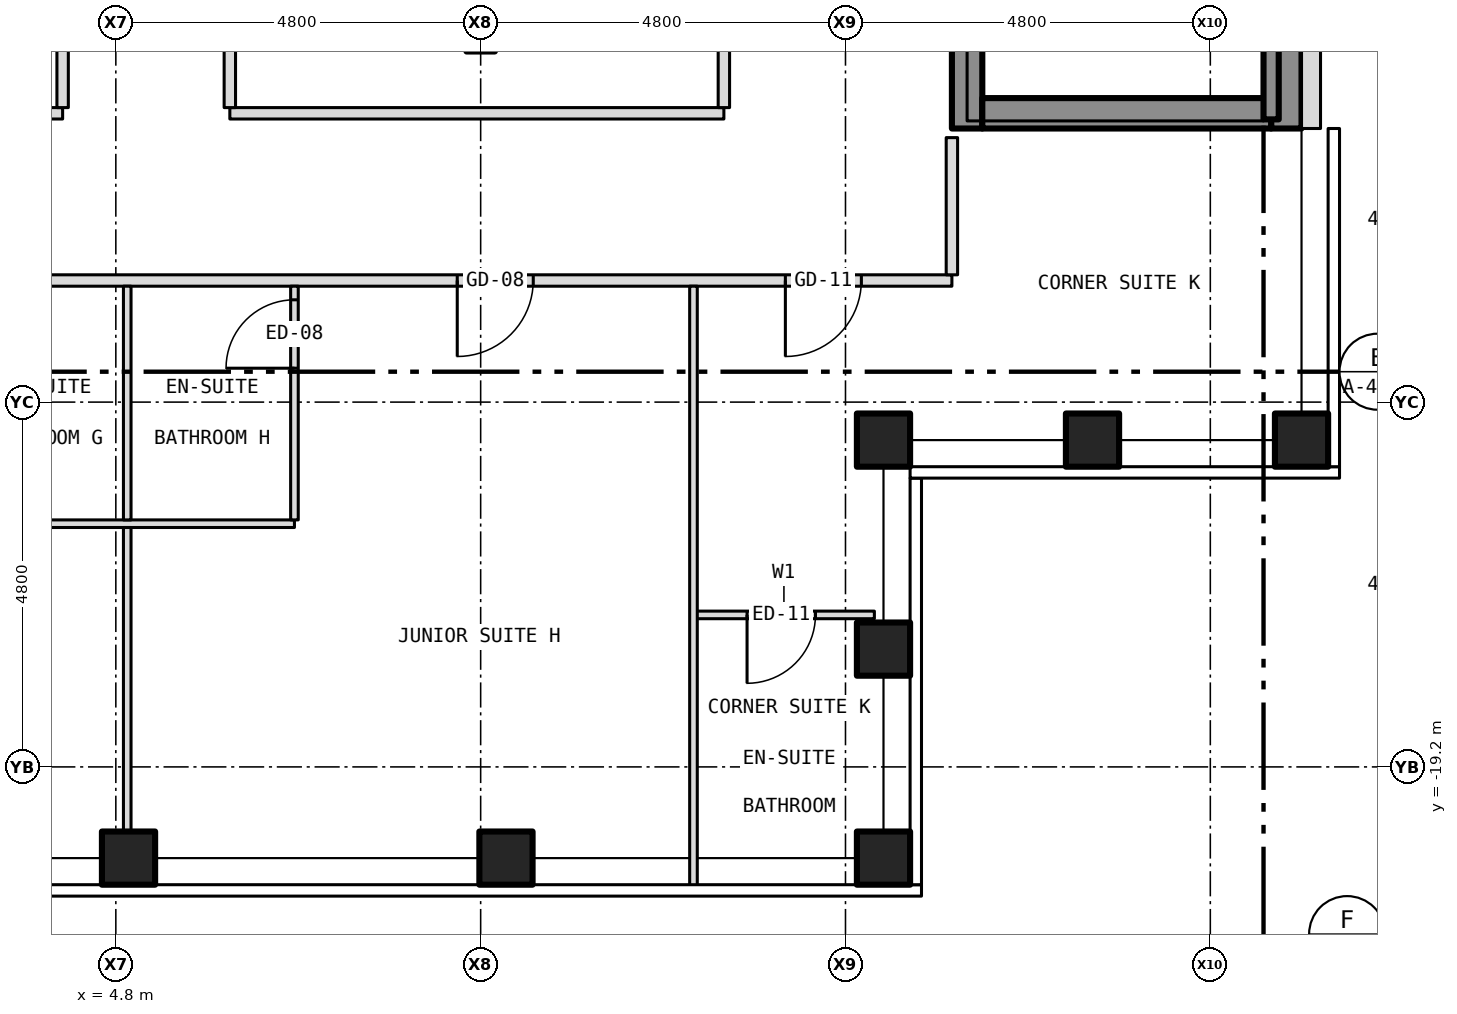
"""IFC4 building model, lengths in metres.
Left out: names, types, materials, properties, quantities, classifications, styles, units other than length and angle.
Written with IfcOpenShell. Run it as: python <this file> out.ifc"""

import sys

from ifc_helpers import new_model, si_unit, direction, frame, frame_2d, origin, origin_2d, place, context, subcontext, project, spatial, rectangle, hollow_rectangle, extrude, element, fill, save


model = new_model("IFC4")
c1 = context("Model", 3, precision=1e-05, world=origin(), true_north=direction((0.0, 1.0)))
c2 = subcontext(c1, "Body", "Model", "MODEL_VIEW")
j1 = project(units=[si_unit("LENGTHUNIT", "METRE"), si_unit("PLANEANGLEUNIT", "RADIAN")], contexts=[c1])
p1 = place(None, origin())
s1 = spatial("IfcSite", under=j1, at=p1, CompositionType="ELEMENT")
p2 = place(p1, origin())
s2 = spatial("IfcBuilding", under=s1, at=p2, CompositionType="ELEMENT")
p3 = place(p2, frame((0.0, 0.0, 198.0)))
s3 = spatial("IfcBuildingStorey", under=s2, at=p3, CompositionType="ELEMENT", Elevation=198.0)
for number, where, z_axis, x_axis in (
    (1, (4.967, -20.4, -0.15), (0.0, 0.0, 1.0), (1.0, 0.0, 0.0)),
    (2, (9.933, -20.4, -0.15), (0.0, 0.0, 1.0), (1.0, 0.0, 0.0)),
    (3, (14.9, -20.4, -0.15), (0.0, 0.0, 1.0), (1.0, 0.0, 0.0)),
    (4, (20.4, -14.9, -0.15), (0.0, 0.0, 1.0), (1.0, 0.0, 0.0)),
    (5, (14.9, -14.9, -0.15), (0.0, 0.0, 1.0), (1.0, 0.0, 0.0)),
    (6, (14.9, -17.65, -0.15), (0.0, 0.0, 1.0), (1.0, 0.0, 0.0)),
    (7, (17.65, -14.9, -0.15), (0.0, 0.0, 1.0), (1.0, 0.0, 0.0)),
):
    element("IfcColumn", number, at=place(p3, frame(where, z_axis=z_axis, x_axis=x_axis)), inside=s3, PredefinedType="COLUMN", context=c2, shape_type="SweptSolid", body=[
        extrude(hollow_rectangle(XDim=0.7, YDim=0.7, WallThickness=0.04, at=origin_2d()), origin(), (0.0, 0.0, 1.0), 3.5),
    ])
p4 = place(p3, frame((16.0, -10.8, 0.0), z_axis=(0.0, 0.0, 1.0), x_axis=(0.0, 1.0, 0.0)))
e8 = element("IfcWall", 8, at=p4, inside=s3, PredefinedType="SHEAR", context=c2, shape_type="SweptSolid", body=[
    extrude(rectangle(XDim=21.6, YDim=0.4, at=frame_2d((10.8, 0.0))), origin(), (0.0, 0.0, 1.0), 3.25),
])
p5 = place(p4, frame((9.4, 0.0, 0.0)))
e9 = element("IfcOpeningElement", 9, at=p5, cuts=e8, PredefinedType="OPENING", context=c2, shape_type="SweptSolid", body=[
    extrude(rectangle(XDim=1.1, YDim=2.1, at=frame_2d((0.55, 1.05))), frame((0.0, 0.212, 0.0), z_axis=(0.0, -1.0, 0.0), x_axis=(1.0, 0.0, 0.0)), (0.0, 0.0, 1.0), 0.424),
])
p6 = place(p4, frame((11.5, 0.0, 0.0)))
e10 = element("IfcOpeningElement", 10, at=p6, cuts=e8, PredefinedType="OPENING", context=c2, shape_type="SweptSolid", body=[
    extrude(rectangle(XDim=1.1, YDim=2.1, at=frame_2d((0.55, 1.05))), frame((0.0, 0.212, 0.0), z_axis=(0.0, -1.0, 0.0), x_axis=(1.0, 0.0, 0.0)), (0.0, 0.0, 1.0), 0.424),
])
p7 = place(p4, frame((13.6, 0.0, 0.0)))
e11 = element("IfcOpeningElement", 11, at=p7, cuts=e8, PredefinedType="OPENING", context=c2, shape_type="SweptSolid", body=[
    extrude(rectangle(XDim=1.1, YDim=2.1, at=frame_2d((0.55, 1.05))), frame((0.0, 0.212, 0.0), z_axis=(0.0, -1.0, 0.0), x_axis=(1.0, 0.0, 0.0)), (0.0, 0.0, 1.0), 0.424),
])
p8 = place(p4, frame((15.7, 0.0, 0.0)))
e12 = element("IfcOpeningElement", 12, at=p8, cuts=e8, PredefinedType="OPENING", context=c2, shape_type="SweptSolid", body=[
    extrude(rectangle(XDim=1.1, YDim=2.1, at=frame_2d((0.55, 1.05))), frame((0.0, 0.212, 0.0), z_axis=(0.0, -1.0, 0.0), x_axis=(1.0, 0.0, 0.0)), (0.0, 0.0, 1.0), 0.424),
])
p9 = place(p4, frame((17.8, 0.0, 0.0)))
e13 = element("IfcOpeningElement", 13, at=p9, cuts=e8, PredefinedType="OPENING", context=c2, shape_type="SweptSolid", body=[
    extrude(rectangle(XDim=1.1, YDim=2.1, at=frame_2d((0.55, 1.05))), frame((0.0, 0.212, 0.0), z_axis=(0.0, -1.0, 0.0), x_axis=(1.0, 0.0, 0.0)), (0.0, 0.0, 1.0), 0.424),
])
p10 = place(p4, frame((5.642, 0.0, 0.0)))
e14 = element("IfcOpeningElement", 14, at=p10, cuts=e8, PredefinedType="OPENING", context=c2, shape_type="SweptSolid", body=[
    extrude(rectangle(XDim=1.1, YDim=2.1, at=frame_2d((0.55, 1.05))), frame((0.0, 0.212, 0.0), z_axis=(0.0, -1.0, 0.0), x_axis=(1.0, 0.0, 0.0)), (0.0, 0.0, 1.0), 0.424),
])
p11 = place(p4, frame((7.5, 0.0, 0.0)))
e15 = element("IfcOpeningElement", 15, at=p11, cuts=e8, PredefinedType="OPENING", context=c2, shape_type="SweptSolid", body=[
    extrude(rectangle(XDim=1.1, YDim=2.1, at=frame_2d((0.55, 1.05))), frame((0.0, 0.212, 0.0), z_axis=(0.0, -1.0, 0.0), x_axis=(1.0, 0.0, 0.0)), (0.0, 0.0, 1.0), 0.424),
])
p12 = place(p4, frame((20.0, 0.0, 0.0)))
e16 = element("IfcOpeningElement", 16, at=p12, cuts=e8, PredefinedType="OPENING", context=c2, shape_type="SweptSolid", body=[
    extrude(rectangle(XDim=0.9, YDim=2.1, at=frame_2d((0.45, 1.05))), frame((0.0, 0.212, 0.0), z_axis=(0.0, -1.0, 0.0), x_axis=(1.0, 0.0, 0.0)), (0.0, 0.0, 1.0), 0.424),
])
p13 = place(p3, frame((20.2, -10.8, 0.0), z_axis=(0.0, 0.0, 1.0), x_axis=(0.0, 1.0, 0.0)))
e17 = element("IfcWall", 17, at=p13, inside=s3, PredefinedType="SHEAR", context=c2, shape_type="SweptSolid", body=[
    extrude(rectangle(XDim=21.6, YDim=0.4, at=frame_2d((10.8, 0.0))), origin(), (0.0, 0.0, 1.0), 3.25),
])
p14 = place(p3, frame((16.2, -10.6, 0.0), z_axis=(0.0, 0.0, 1.0), x_axis=(1.0, 0.0, 0.0)))
e18 = element("IfcWall", 18, at=p14, inside=s3, PredefinedType="SHEAR", context=c2, shape_type="SweptSolid", body=[
    extrude(rectangle(XDim=3.8, YDim=0.4, at=frame_2d((1.9, 0.0))), origin(), (0.0, 0.0, 1.0), 3.25),
])
p15 = place(p3, frame((20.525, -10.8, 0.0), z_axis=(0.0, 0.0, 1.0), x_axis=(0.0, 1.0, 0.0)))
e19 = element("IfcWall", 19, at=p15, inside=s3, PredefinedType="SOLIDWALL", context=c2, shape_type="SweptSolid", body=[
    extrude(rectangle(XDim=21.6, YDim=0.25, at=frame_2d((10.8, 0.0))), origin(), (0.0, 0.0, 1.0), 3.5),
])
p16 = place(p15, frame((2.95, 0.0, 1.0)))
e20 = element("IfcOpeningElement", 20, at=p16, cuts=e19, PredefinedType="OPENING", context=c2, shape_type="SweptSolid", body=[
    extrude(rectangle(XDim=0.6, YDim=1.5, at=frame_2d((0.3, 0.75))), frame((0.0, 0.137, 0.0), z_axis=(0.0, -1.0, 0.0), x_axis=(1.0, 0.0, 0.0)), (0.0, 0.0, 1.0), 0.274),
])
p17 = place(p3, frame((12.4, -17.2, 0.0), z_axis=(0.0, 0.0, 1.0), x_axis=(1.0, 0.0, 0.0)))
e21 = element("IfcWall", 21, at=p17, inside=s3, PredefinedType="PARTITIONING", context=c2, shape_type="SweptSolid", body=[
    extrude(rectangle(XDim=2.38, YDim=0.1, at=frame_2d((1.19, 0.0))), origin(), (0.0, 0.0, 1.0), 3.35),
])
p18 = place(p17, frame((0.705, 0.0, 0.0)))
e22 = element("IfcOpeningElement", 22, at=p18, cuts=e21, PredefinedType="OPENING", context=c2, shape_type="SweptSolid", body=[
    extrude(rectangle(XDim=0.9, YDim=2.1, at=frame_2d((0.45, 1.05))), frame((0.0, 0.062, 0.0), z_axis=(0.0, -1.0, 0.0), x_axis=(1.0, 0.0, 0.0)), (0.0, 0.0, 1.0), 0.124),
])
p19 = place(p3, frame((2.75, -16.0, 0.0), z_axis=(0.0, 0.0, 1.0), x_axis=(1.0, 0.0, 0.0)))
e23 = element("IfcWall", 23, at=p19, inside=s3, PredefinedType="PARTITIONING", context=c2, shape_type="SweptSolid", body=[
    extrude(rectangle(XDim=4.4, YDim=0.1, at=frame_2d((2.2, 0.0))), origin(), (0.0, 0.0, 1.0), 3.35),
])
p20 = place(p3, frame((-15.8, -12.8, 0.0), z_axis=(0.0, 0.0, 1.0), x_axis=(1.0, 0.0, 0.0)))
e24 = element("IfcWall", 24, at=p20, inside=s3, PredefinedType="PARTITIONING", context=c2, shape_type="SweptSolid", body=[
    extrude(rectangle(XDim=31.6, YDim=0.15, at=frame_2d((15.8, 0.0))), origin(), (0.0, 0.0, 1.0), 3.35),
])
p21 = place(p20, frame((6.466, 0.0, 0.0)))
e25 = element("IfcOpeningElement", 25, at=p21, cuts=e24, PredefinedType="OPENING", context=c2, shape_type="SweptSolid", body=[
    extrude(rectangle(XDim=1.0, YDim=2.1, at=frame_2d((0.5, 1.05))), frame((0.0, 0.087, 0.0), z_axis=(0.0, -1.0, 0.0), x_axis=(1.0, 0.0, 0.0)), (0.0, 0.0, 1.0), 0.174),
])
p22 = place(p20, frame((11.434, 0.0, 0.0)))
e26 = element("IfcOpeningElement", 26, at=p22, cuts=e24, PredefinedType="OPENING", context=c2, shape_type="SweptSolid", body=[
    extrude(rectangle(XDim=1.0, YDim=2.1, at=frame_2d((0.5, 1.05))), frame((0.0, 0.087, 0.0), z_axis=(0.0, -1.0, 0.0), x_axis=(1.0, 0.0, 0.0)), (0.0, 0.0, 1.0), 0.174),
])
p23 = place(p20, frame((15.442, 0.0, 0.0)))
e27 = element("IfcOpeningElement", 27, at=p23, cuts=e24, PredefinedType="OPENING", context=c2, shape_type="SweptSolid", body=[
    extrude(rectangle(XDim=1.0, YDim=2.1, at=frame_2d((0.5, 1.05))), frame((0.0, 0.087, 0.0), z_axis=(0.0, -1.0, 0.0), x_axis=(1.0, 0.0, 0.0)), (0.0, 0.0, 1.0), 0.174),
])
p24 = place(p20, frame((25.092, 0.0, 0.0)))
e28 = element("IfcOpeningElement", 28, at=p24, cuts=e24, PredefinedType="OPENING", context=c2, shape_type="SweptSolid", body=[
    extrude(rectangle(XDim=1.0, YDim=2.1, at=frame_2d((0.5, 1.05))), frame((0.0, 0.087, 0.0), z_axis=(0.0, -1.0, 0.0), x_axis=(1.0, 0.0, 0.0)), (0.0, 0.0, 1.0), 0.174),
])
p25 = place(p20, frame((1.192, 0.0, 0.0)))
e29 = element("IfcOpeningElement", 29, at=p25, cuts=e24, PredefinedType="OPENING", context=c2, shape_type="SweptSolid", body=[
    extrude(rectangle(XDim=1.0, YDim=2.1, at=frame_2d((0.5, 1.05))), frame((0.0, 0.087, 0.0), z_axis=(0.0, -1.0, 0.0), x_axis=(1.0, 0.0, 0.0)), (0.0, 0.0, 1.0), 0.174),
])
p26 = place(p20, frame((29.409, 0.0, 0.0)))
e30 = element("IfcOpeningElement", 30, at=p26, cuts=e24, PredefinedType="OPENING", context=c2, shape_type="SweptSolid", body=[
    extrude(rectangle(XDim=1.0, YDim=2.1, at=frame_2d((0.5, 1.05))), frame((0.0, 0.087, 0.0), z_axis=(0.0, -1.0, 0.0), x_axis=(1.0, 0.0, 0.0)), (0.0, 0.0, 1.0), 0.174),
])
p27 = place(p3, frame((-12.8, -10.6, 0.0), z_axis=(0.0, 0.0, 1.0), x_axis=(1.0, 0.0, 0.0)))
e31 = element("IfcWall", 31, at=p27, inside=s3, PredefinedType="PARTITIONING", context=c2, shape_type="SweptSolid", body=[
    extrude(rectangle(XDim=16.9, YDim=0.15, at=frame_2d((8.45, 0.0))), origin(), (0.0, 0.0, 1.0), 3.35),
])
p28 = place(p27, frame((5.95, 0.0, 0.0)))
e32 = element("IfcOpeningElement", 32, at=p28, cuts=e31, PredefinedType="OPENING", context=c2, shape_type="SweptSolid", body=[
    extrude(rectangle(XDim=0.9, YDim=2.1, at=frame_2d((0.45, 1.05))), frame((0.0, 0.087, 0.0), z_axis=(0.0, -1.0, 0.0), x_axis=(1.0, 0.0, 0.0)), (0.0, 0.0, 1.0), 0.174),
])
p29 = place(p3, frame((6.3, -10.6, 0.0), z_axis=(0.0, 0.0, 1.0), x_axis=(1.0, 0.0, 0.0)))
e33 = element("IfcWall", 33, at=p29, inside=s3, PredefinedType="PARTITIONING", context=c2, shape_type="SweptSolid", body=[
    extrude(rectangle(XDim=6.5, YDim=0.15, at=frame_2d((3.25, 0.0))), origin(), (0.0, 0.0, 1.0), 3.35),
])
p30 = place(p3, frame((4.1, -10.525, 0.0), z_axis=(0.0, 0.0, 1.0), x_axis=(0.0, 1.0, 0.0)))
e34 = element("IfcWall", 34, at=p30, inside=s3, PredefinedType="PARTITIONING", context=c2, shape_type="SweptSolid", body=[
    extrude(rectangle(XDim=17.95, YDim=0.15, at=frame_2d((8.975, 0.0))), origin(), (0.0, 0.0, 1.0), 3.35),
])
p31 = place(p30, frame((11.95, 0.0, 0.0)))
e35 = element("IfcOpeningElement", 35, at=p31, cuts=e34, PredefinedType="OPENING", context=c2, shape_type="SweptSolid", body=[
    extrude(rectangle(XDim=0.9, YDim=2.1, at=frame_2d((0.45, 1.05))), frame((0.0, 0.087, 0.0), z_axis=(0.0, -1.0, 0.0), x_axis=(1.0, 0.0, 0.0)), (0.0, 0.0, 1.0), 0.174),
])
p32 = place(p30, frame((4.775, 0.0, 0.0)))
e36 = element("IfcOpeningElement", 36, at=p32, cuts=e34, PredefinedType="OPENING", context=c2, shape_type="SweptSolid", body=[
    extrude(rectangle(XDim=0.9, YDim=2.1, at=frame_2d((0.45, 1.05))), frame((0.0, 0.087, 0.0), z_axis=(0.0, -1.0, 0.0), x_axis=(1.0, 0.0, 0.0)), (0.0, 0.0, 1.0), 0.174),
])
p33 = place(p3, frame((4.95, -20.28, 0.0), z_axis=(0.0, 0.0, 1.0), x_axis=(0.0, 1.0, 0.0)))
e37 = element("IfcWall", 37, at=p33, inside=s3, PredefinedType="PARTITIONING", context=c2, shape_type="SweptSolid", body=[
    extrude(rectangle(XDim=4.23, YDim=0.1, at=frame_2d((2.115, 0.0))), origin(), (0.0, 0.0, 1.0), 2.817),
])
p34 = place(p3, frame((4.95, -15.95, 0.0), z_axis=(0.0, 0.0, 1.0), x_axis=(0.0, 1.0, 0.0)))
e38 = element("IfcWall", 38, at=p34, inside=s3, PredefinedType="PARTITIONING", context=c2, shape_type="SweptSolid", body=[
    extrude(rectangle(XDim=3.075, YDim=0.1, at=frame_2d((1.538, 0.0))), origin(), (0.0, 0.0, 1.0), 2.817),
])
p35 = place(p3, frame((6.3, -10.525, 0.0), z_axis=(0.0, 0.0, 1.0), x_axis=(0.0, 1.0, 0.0)))
e39 = element("IfcWall", 39, at=p35, inside=s3, PredefinedType="PARTITIONING", context=c2, shape_type="SweptSolid", body=[
    extrude(rectangle(XDim=17.95, YDim=0.15, at=frame_2d((8.975, 0.0))), origin(), (0.0, 0.0, 1.0), 3.35),
])
p36 = place(p35, frame((13.825, 0.0, 0.0)))
e40 = element("IfcOpeningElement", 40, at=p36, cuts=e39, PredefinedType="OPENING", context=c2, shape_type="SweptSolid", body=[
    extrude(rectangle(XDim=0.9, YDim=2.1, at=frame_2d((0.45, 1.05))), frame((0.0, 0.087, 0.0), z_axis=(0.0, -1.0, 0.0), x_axis=(1.0, 0.0, 0.0)), (0.0, 0.0, 1.0), 0.174),
])
p37 = place(p35, frame((4.775, 0.0, 0.0)))
e41 = element("IfcOpeningElement", 41, at=p37, cuts=e39, PredefinedType="OPENING", context=c2, shape_type="SweptSolid", body=[
    extrude(rectangle(XDim=0.9, YDim=2.1, at=frame_2d((0.45, 1.05))), frame((0.0, 0.087, 0.0), z_axis=(0.0, -1.0, 0.0), x_axis=(1.0, 0.0, 0.0)), (0.0, 0.0, 1.0), 0.174),
])
p38 = place(p3, frame((7.15, -15.95, 0.0), z_axis=(0.0, 0.0, 1.0), x_axis=(0.0, 1.0, 0.0)))
e42 = element("IfcWall", 42, at=p38, inside=s3, PredefinedType="PARTITIONING", context=c2, shape_type="SweptSolid", body=[
    extrude(rectangle(XDim=3.075, YDim=0.1, at=frame_2d((1.538, 0.0))), origin(), (0.0, 0.0, 1.0), 3.35),
])
p39 = place(p38, frame((1.996, 0.0, 0.0)))
e43 = element("IfcOpeningElement", 43, at=p39, cuts=e42, PredefinedType="OPENING", context=c2, shape_type="SweptSolid", body=[
    extrude(rectangle(XDim=0.9, YDim=2.1, at=frame_2d((0.45, 1.05))), frame((0.0, 0.062, 0.0), z_axis=(0.0, -1.0, 0.0), x_axis=(1.0, 0.0, 0.0)), (0.0, 0.0, 1.0), 0.124),
])
p40 = place(p3, frame((12.4, -20.78, 0.0), z_axis=(0.0, 0.0, 1.0), x_axis=(0.0, 1.0, 0.0)))
e44 = element("IfcWall", 44, at=p40, inside=s3, PredefinedType="PARTITIONING", context=c2, shape_type="SweptSolid", body=[
    extrude(rectangle(XDim=7.905, YDim=0.1, at=frame_2d((3.953, 0.0))), origin(), (0.0, 0.0, 1.0), 3.35),
])
p41 = place(p3, frame((12.8, -10.525, 0.0), z_axis=(0.0, 0.0, 1.0), x_axis=(0.0, 1.0, 0.0)))
e45 = element("IfcWall", 45, at=p41, inside=s3, PredefinedType="PARTITIONING", context=c2, shape_type="SweptSolid", body=[
    extrude(rectangle(XDim=8.525, YDim=0.15, at=frame_2d((4.262, 0.0))), origin(), (0.0, 0.0, 1.0), 3.35),
])
p42 = place(p3, frame((15.8, -12.725, 0.0), z_axis=(0.0, 0.0, 1.0), x_axis=(0.0, 1.0, 0.0)))
e46 = element("IfcWall", 46, at=p42, inside=s3, PredefinedType="PARTITIONING", context=c2, shape_type="SweptSolid", body=[
    extrude(rectangle(XDim=1.805, YDim=0.15, at=frame_2d((0.903, 0.0))), origin(), (0.0, 0.0, 1.0), 3.35),
])
p43 = place(p3, frame((20.0, -10.68, 0.0), z_axis=(0.0, 0.0, 1.0), x_axis=(0.0, 1.0, 0.0)))
e47 = element("IfcWall", 47, at=p43, inside=s3, PredefinedType="SHEAR", context=c2, shape_type="SweptSolid", body=[
    extrude(rectangle(XDim=6.98, YDim=0.2, at=frame_2d((3.49, 0.0))), origin(), (0.0, 0.0, 1.0), 3.25),
])
p44 = place(p24, origin())
e48 = element("IfcDoor", 48, at=p44, inside=s3, OperationType="SINGLE_SWING_LEFT", PredefinedType="DOOR", context=c2, shape_type="SweptSolid", body=[
    extrude(rectangle(XDim=1.0, YDim=2.1, at=frame_2d((0.5, 1.05))), frame((0.0, 0.025, 0.0), z_axis=(0.0, -1.0, 0.0), x_axis=(1.0, 0.0, 0.0)), (0.0, 0.0, 1.0), 0.05),
])
fill(e28, e48)
p45 = place(p39, origin())
e49 = element("IfcDoor", 49, at=p45, inside=s3, OperationType="SINGLE_SWING_LEFT", PredefinedType="DOOR", context=c2, shape_type="SweptSolid", body=[
    extrude(rectangle(XDim=0.9, YDim=2.1, at=frame_2d((0.45, 1.05))), frame((0.0, 0.025, 0.0), z_axis=(0.0, -1.0, 0.0), x_axis=(1.0, 0.0, 0.0)), (0.0, 0.0, 1.0), 0.05),
])
fill(e43, e49)
p46 = place(p18, origin())
e50 = element("IfcDoor", 50, at=p46, inside=s3, OperationType="SINGLE_SWING_LEFT", PredefinedType="DOOR", context=c2, shape_type="SweptSolid", body=[
    extrude(rectangle(XDim=0.9, YDim=2.1, at=frame_2d((0.45, 1.05))), frame((0.0, 0.025, 0.0), z_axis=(0.0, -1.0, 0.0), x_axis=(1.0, 0.0, 0.0)), (0.0, 0.0, 1.0), 0.05),
])
fill(e22, e50)
p47 = place(p26, origin())
e51 = element("IfcDoor", 51, at=p47, inside=s3, OperationType="SINGLE_SWING_LEFT", PredefinedType="DOOR", context=c2, shape_type="SweptSolid", body=[
    extrude(rectangle(XDim=1.0, YDim=2.1, at=frame_2d((0.5, 1.05))), frame((0.0, 0.025, 0.0), z_axis=(0.0, -1.0, 0.0), x_axis=(1.0, 0.0, 0.0)), (0.0, 0.0, 1.0), 0.05),
])
fill(e30, e51)
save(model, sys.argv[1])
